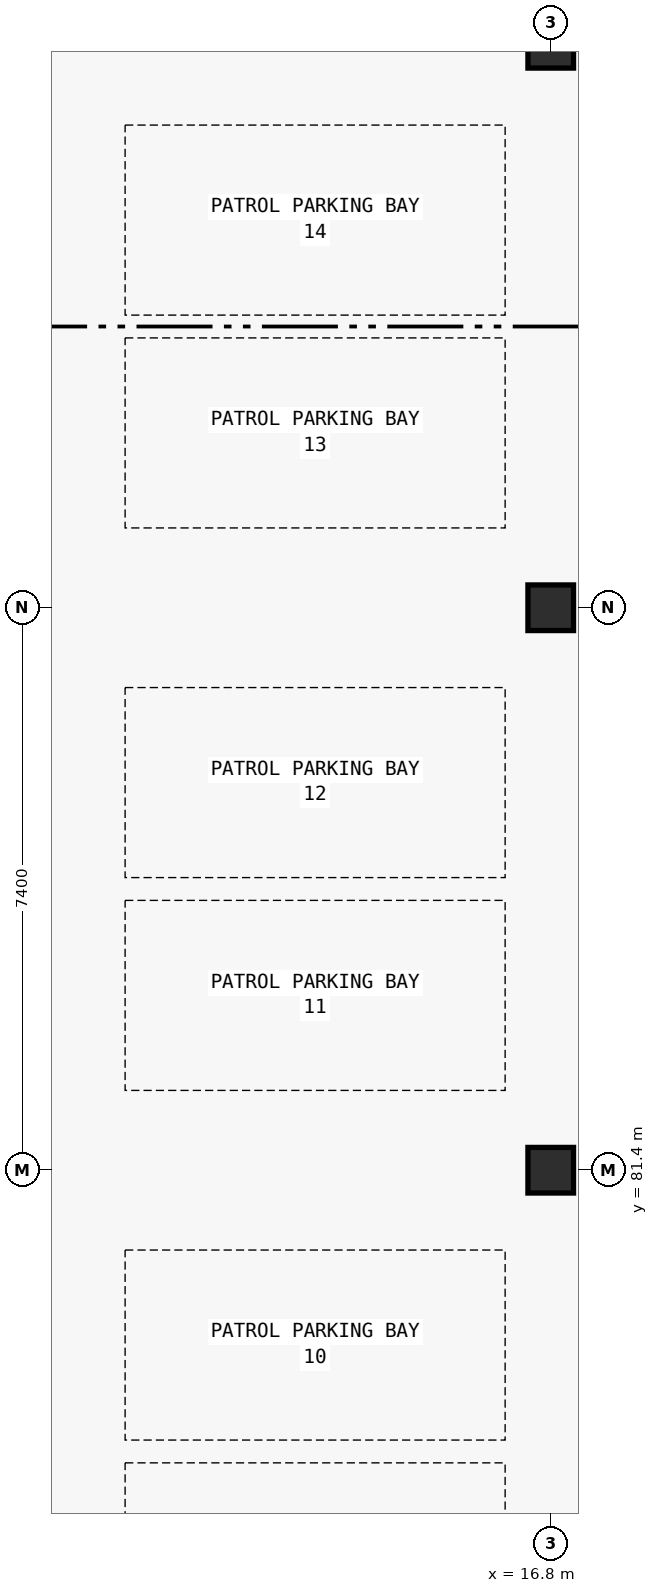
"""IFC4 building model, lengths in metres.
Left out: names, types, materials, properties, quantities, classifications, styles, units other than length and angle.
Written with IfcOpenShell. Run it as: python <this file> out.ifc"""

import sys

from ifc_helpers import new_model, si_unit, direction, frame, origin, origin_2d, place, context, subcontext, project, spatial, rectangle, extrude, element, save


model = new_model("IFC4")
c1 = context("Model", 3, precision=1e-05, world=origin(), true_north=direction((0.0, 1.0)))
c2 = subcontext(c1, "Body", "Model", "MODEL_VIEW")
j1 = project(units=[si_unit("LENGTHUNIT", "METRE"), si_unit("PLANEANGLEUNIT", "RADIAN")], contexts=[c1])
p1 = place(None, origin())
s1 = spatial("IfcSite", under=j1, at=p1, CompositionType="ELEMENT")
p2 = place(p1, origin())
s2 = spatial("IfcBuilding", under=s1, at=p2, CompositionType="ELEMENT")
p3 = place(p2, frame((0.0, 0.0, -4.8)))
s3 = spatial("IfcBuildingStorey", under=s2, at=p3, CompositionType="ELEMENT", Elevation=-4.8)
for number, where, z_axis, x_axis in (
    (1, (16.8, 81.4, 0.0), (0.0, 0.0, 1.0), (1.0, 0.0, 0.0)),
    (2, (16.8, 88.8, 0.0), (0.0, 0.0, 1.0), (1.0, 0.0, 0.0)),
    (3, (16.8, 96.2, 0.0), (0.0, 0.0, 1.0), (1.0, 0.0, 0.0)),
):
    element("IfcColumn", number, at=place(p3, frame(where, z_axis=z_axis, x_axis=x_axis)), inside=s3, PredefinedType="COLUMN", context=c2, shape_type="SweptSolid", body=[
        extrude(rectangle(XDim=0.6, YDim=0.6, at=origin_2d()), origin(), (0.0, 0.0, 1.0), 4.8),
    ])
save(model, sys.argv[1])
